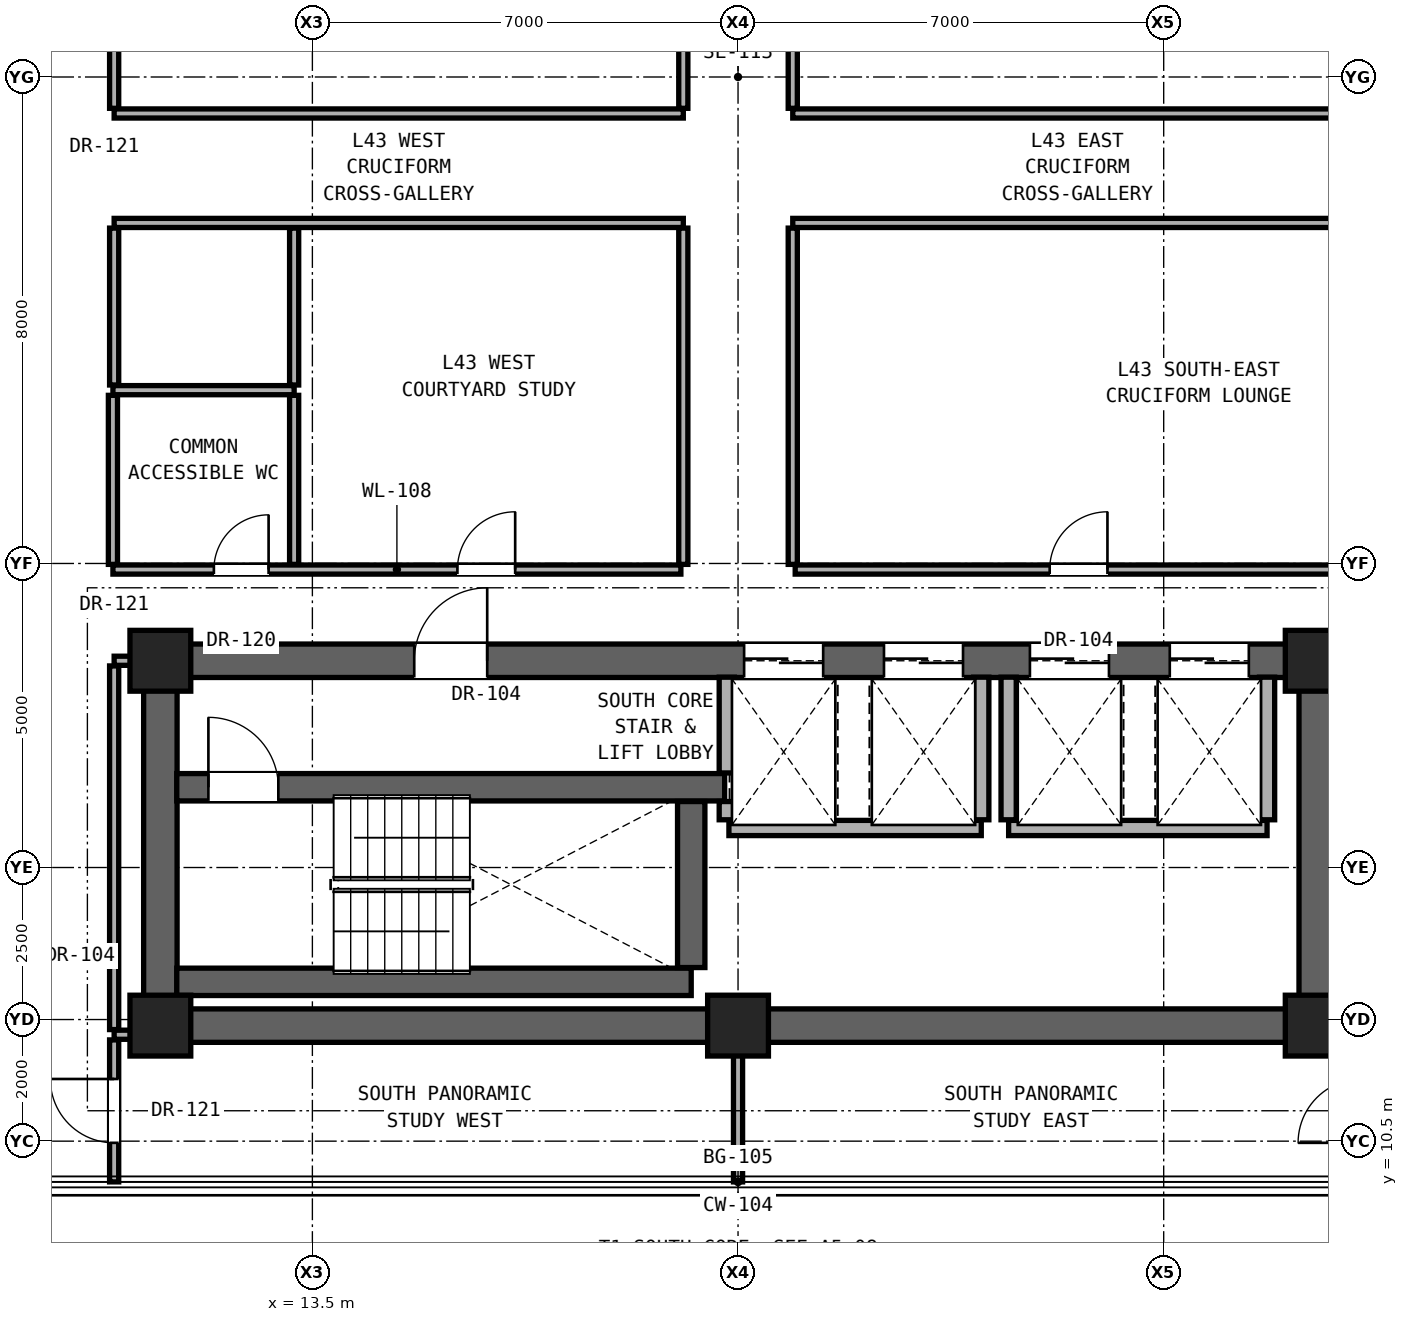
"""IFC4 building model, lengths in metres.
Left out: names, types, materials, properties, quantities, classifications, styles, units other than length and angle.
Written with IfcOpenShell. Run it as: python <this file> out.ifc"""

import sys

from ifc_helpers import new_model, si_unit, direction, frame, frame_2d, origin, origin_2d, place, context, subcontext, project, spatial, rectangle, extrude, element, fill, save


model = new_model("IFC4")
c1 = context("Model", 3, precision=1e-05, world=origin(), true_north=direction((0.0, 1.0)))
c2 = subcontext(c1, "Body", "Model", "MODEL_VIEW")
j1 = project(units=[si_unit("LENGTHUNIT", "METRE"), si_unit("PLANEANGLEUNIT", "RADIAN")], contexts=[c1])
p1 = place(None, origin())
s1 = spatial("IfcSite", under=j1, at=p1, CompositionType="ELEMENT")
p2 = place(p1, origin())
s2 = spatial("IfcBuilding", under=s1, at=p2, CompositionType="ELEMENT")
p3 = place(p2, frame((0.0, 0.0, 154.4)))
s3 = spatial("IfcBuildingStorey", under=s2, at=p3, CompositionType="ELEMENT", Elevation=154.4)
for number, where, z_axis, x_axis in (
    (1, (11.0, 12.4, 0.0), (0.0, 0.0, 1.0), (1.0, 0.0, 0.0)),
    (2, (20.5, 12.4, 0.0), (0.0, 0.0, 1.0), (1.0, 0.0, 0.0)),
    (3, (30.0, 12.4, 0.0), (0.0, 0.0, 1.0), (1.0, 0.0, 0.0)),
    (4, (11.0, 18.4, 0.0), (0.0, 0.0, 1.0), (1.0, 0.0, 0.0)),
    (5, (30.0, 18.4, 0.0), (0.0, 0.0, 1.0), (1.0, 0.0, 0.0)),
):
    element("IfcColumn", number, at=place(p3, frame(where, z_axis=z_axis, x_axis=x_axis)), inside=s3, PredefinedType="COLUMN", context=c2, shape_type="SweptSolid", body=[
        extrude(rectangle(XDim=1.0, YDim=1.0, at=origin_2d()), origin(), (0.0, 0.0, 1.0), 3.25),
    ])
p4 = place(p3, frame((11.0, 12.4, 0.0), z_axis=(0.0, 0.0, 1.0), x_axis=(1.0, 0.0, 0.0)))
e6 = element("IfcWall", 6, at=p4, inside=s3, PredefinedType="SHEAR", context=c2, shape_type="SweptSolid", body=[
    extrude(rectangle(XDim=19.0, YDim=0.55, at=frame_2d((9.5, 0.0))), origin(), (0.0, 0.0, 1.0), 3.05),
])
for number, where, z_axis, x_axis in (
    (7, (11.0, 12.4, 0.0), (0.0, 0.0, 1.0), (0.0, 1.0, 0.0)),
    (8, (30.0, 12.4, 0.0), (0.0, 0.0, 1.0), (0.0, 1.0, 0.0)),
):
    element("IfcWall", number, at=place(p3, frame(where, z_axis=z_axis, x_axis=x_axis)), inside=s3, PredefinedType="SHEAR", context=c2, shape_type="SweptSolid", body=[
        extrude(rectangle(XDim=6.0, YDim=0.55, at=frame_2d((3.0, 0.0))), origin(), (0.0, 0.0, 1.0), 3.05),
    ])
p5 = place(p3, frame((11.0, 18.4, 0.0), z_axis=(0.0, 0.0, 1.0), x_axis=(1.0, 0.0, 0.0)))
e9 = element("IfcWall", 9, at=p5, inside=s3, PredefinedType="SHEAR", context=c2, shape_type="SweptSolid", body=[
    extrude(rectangle(XDim=19.0, YDim=0.55, at=frame_2d((9.5, 0.0))), origin(), (0.0, 0.0, 1.0), 3.05),
])
p6 = place(p5, frame((4.175, 0.0, 0.0)))
e10 = element("IfcOpeningElement", 10, at=p6, cuts=e9, PredefinedType="OPENING", context=c2, shape_type="SweptSolid", body=[
    extrude(rectangle(XDim=1.2, YDim=2.25, at=frame_2d((0.6, 1.125))), frame((0.0, 0.285, 0.0), z_axis=(0.0, -1.0, 0.0), x_axis=(1.0, 0.0, 0.0)), (0.0, 0.0, 1.0), 0.57),
])
p7 = place(p5, frame((9.6, 0.0, 0.0)))
e11 = element("IfcOpeningElement", 11, at=p7, cuts=e9, PredefinedType="OPENING", context=c2, shape_type="SweptSolid", body=[
    extrude(rectangle(XDim=1.3, YDim=2.3, at=frame_2d((0.65, 1.15))), frame((0.0, 0.285, 0.0), z_axis=(0.0, -1.0, 0.0), x_axis=(1.0, 0.0, 0.0)), (0.0, 0.0, 1.0), 0.57),
])
p8 = place(p5, frame((11.9, 0.0, 0.0)))
e12 = element("IfcOpeningElement", 12, at=p8, cuts=e9, PredefinedType="OPENING", context=c2, shape_type="SweptSolid", body=[
    extrude(rectangle(XDim=1.3, YDim=2.3, at=frame_2d((0.65, 1.15))), frame((0.0, 0.285, 0.0), z_axis=(0.0, -1.0, 0.0), x_axis=(1.0, 0.0, 0.0)), (0.0, 0.0, 1.0), 0.57),
])
p9 = place(p5, frame((14.3, 0.0, 0.0)))
e13 = element("IfcOpeningElement", 13, at=p9, cuts=e9, PredefinedType="OPENING", context=c2, shape_type="SweptSolid", body=[
    extrude(rectangle(XDim=1.3, YDim=2.3, at=frame_2d((0.65, 1.15))), frame((0.0, 0.285, 0.0), z_axis=(0.0, -1.0, 0.0), x_axis=(1.0, 0.0, 0.0)), (0.0, 0.0, 1.0), 0.57),
])
p10 = place(p5, frame((16.6, 0.0, 0.0)))
e14 = element("IfcOpeningElement", 14, at=p10, cuts=e9, PredefinedType="OPENING", context=c2, shape_type="SweptSolid", body=[
    extrude(rectangle(XDim=1.3, YDim=2.3, at=frame_2d((0.65, 1.15))), frame((0.0, 0.285, 0.0), z_axis=(0.0, -1.0, 0.0), x_axis=(1.0, 0.0, 0.0)), (0.0, 0.0, 1.0), 0.57),
])
p11 = place(p3, frame((10.24, 12.25, 0.0), z_axis=(0.0, 0.0, 1.0), x_axis=(1.0, 0.0, 0.0)))
e15 = element("IfcWall", 15, at=p11, inside=s3, PredefinedType="PARTITIONING", context=c2, shape_type="SweptSolid", body=[
    extrude(rectangle(XDim=0.49, YDim=0.15, at=frame_2d((0.245, 0.0))), origin(), (0.0, 0.0, 1.0), 3.05),
])
p12 = place(p3, frame((11.27, 13.12, 0.0), z_axis=(0.0, 0.0, 1.0), x_axis=(1.0, 0.0, 0.0)))
e16 = element("IfcWall", 16, at=p12, inside=s3, PredefinedType="SHEAR", context=c2, shape_type="SweptSolid", body=[
    extrude(rectangle(XDim=8.46, YDim=0.45, at=frame_2d((4.23, 0.0))), origin(), (0.0, 0.0, 1.0), 3.05),
])
p13 = place(p3, frame((20.35, 15.65, 0.0), z_axis=(0.0, 0.0, 1.0), x_axis=(1.0, 0.0, 0.0)))
e17 = element("IfcWall", 17, at=p13, inside=s3, PredefinedType="SOLIDWALL", context=c2, shape_type="SweptSolid", body=[
    extrude(rectangle(XDim=4.15, YDim=0.25, at=frame_2d((2.075, 0.0))), origin(), (0.0, 0.0, 1.0), 3.05),
])
p14 = place(p3, frame((24.95, 15.65, 0.0), z_axis=(0.0, 0.0, 1.0), x_axis=(1.0, 0.0, 0.0)))
e18 = element("IfcWall", 18, at=p14, inside=s3, PredefinedType="SOLIDWALL", context=c2, shape_type="SweptSolid", body=[
    extrude(rectangle(XDim=4.25, YDim=0.25, at=frame_2d((2.125, 0.0))), origin(), (0.0, 0.0, 1.0), 3.05),
])
p15 = place(p3, frame((11.27, 16.32, 0.0), z_axis=(0.0, 0.0, 1.0), x_axis=(1.0, 0.0, 0.0)))
e19 = element("IfcWall", 19, at=p15, inside=s3, PredefinedType="SHEAR", context=c2, shape_type="SweptSolid", body=[
    extrude(rectangle(XDim=9.01, YDim=0.45, at=frame_2d((4.505, 0.0))), origin(), (0.0, 0.0, 1.0), 3.05),
])
p16 = place(p15, frame((0.52, 0.0, 0.0)))
e20 = element("IfcOpeningElement", 20, at=p16, cuts=e19, PredefinedType="OPENING", context=c2, shape_type="SweptSolid", body=[
    extrude(rectangle(XDim=1.15, YDim=2.2, at=frame_2d((0.575, 1.1))), frame((0.0, 0.235, 0.0), z_axis=(0.0, -1.0, 0.0), x_axis=(1.0, 0.0, 0.0)), (0.0, 0.0, 1.0), 0.47),
])
p17 = place(p3, frame((10.24, 18.4, 0.0), z_axis=(0.0, 0.0, 1.0), x_axis=(1.0, 0.0, 0.0)))
e21 = element("IfcWall", 21, at=p17, inside=s3, PredefinedType="PARTITIONING", context=c2, shape_type="SweptSolid", body=[
    extrude(rectangle(XDim=0.49, YDim=0.15, at=frame_2d((0.245, 0.0))), origin(), (0.0, 0.0, 1.0), 2.442),
])
p18 = place(p3, frame((10.22, 19.9, 0.0), z_axis=(0.0, 0.0, 1.0), x_axis=(1.0, 0.0, 0.0)))
e22 = element("IfcWall", 22, at=p18, inside=s3, PredefinedType="PARTITIONING", context=c2, shape_type="SweptSolid", body=[
    extrude(rectangle(XDim=9.34, YDim=0.15, at=frame_2d((4.67, 0.0))), origin(), (0.0, 0.0, 1.0), 2.186),
])
p19 = place(p18, frame((1.66, 0.0, 0.0)))
e23 = element("IfcOpeningElement", 23, at=p19, cuts=e22, PredefinedType="OPENING", context=c2, shape_type="SweptSolid", body=[
    extrude(rectangle(XDim=0.9, YDim=2.1, at=frame_2d((0.45, 1.05))), frame((0.0, 0.085, 0.0), z_axis=(0.0, -1.0, 0.0), x_axis=(1.0, 0.0, 0.0)), (0.0, 0.0, 1.0), 0.17),
])
p20 = place(p18, frame((5.665, 0.0, 0.0)))
e24 = element("IfcOpeningElement", 24, at=p20, cuts=e22, PredefinedType="OPENING", context=c2, shape_type="SweptSolid", body=[
    extrude(rectangle(XDim=0.95, YDim=2.15, at=frame_2d((0.475, 1.075))), frame((0.0, 0.085, 0.0), z_axis=(0.0, -1.0, 0.0), x_axis=(1.0, 0.0, 0.0)), (0.0, 0.0, 1.0), 0.17),
])
p21 = place(p3, frame((21.44, 19.9, 0.0), z_axis=(0.0, 0.0, 1.0), x_axis=(1.0, 0.0, 0.0)))
e25 = element("IfcWall", 25, at=p21, inside=s3, PredefinedType="PARTITIONING", context=c2, shape_type="SweptSolid", body=[
    extrude(rectangle(XDim=9.32, YDim=0.15, at=frame_2d((4.66, 0.0))), origin(), (0.0, 0.0, 1.0), 2.186),
])
p22 = place(p21, frame((4.185, 0.0, 0.0)))
e26 = element("IfcOpeningElement", 26, at=p22, cuts=e25, PredefinedType="OPENING", context=c2, shape_type="SweptSolid", body=[
    extrude(rectangle(XDim=0.95, YDim=2.15, at=frame_2d((0.475, 1.075))), frame((0.0, 0.085, 0.0), z_axis=(0.0, -1.0, 0.0), x_axis=(1.0, 0.0, 0.0)), (0.0, 0.0, 1.0), 0.17),
])
p23 = place(p3, frame((10.22, 22.85, 0.0), z_axis=(0.0, 0.0, 1.0), x_axis=(1.0, 0.0, 0.0)))
e27 = element("IfcWall", 27, at=p23, inside=s3, PredefinedType="PARTITIONING", context=c2, shape_type="SweptSolid", body=[
    extrude(rectangle(XDim=2.98, YDim=0.15, at=frame_2d((1.49, 0.0))), origin(), (0.0, 0.0, 1.0), 2.186),
])
for number, where, z_axis, x_axis in (
    (28, (10.24, 25.6, 0.0), (0.0, 0.0, 1.0), (1.0, 0.0, 0.0)),
    (29, (21.4, 25.6, 0.0), (0.0, 0.0, 1.0), (1.0, 0.0, 0.0)),
    (30, (10.24, 27.4, 0.0), (0.0, 0.0, 1.0), (1.0, 0.0, 0.0)),
    (31, (21.4, 27.4, 0.0), (0.0, 0.0, 1.0), (1.0, 0.0, 0.0)),
):
    element("IfcWall", number, at=place(p3, frame(where, z_axis=z_axis, x_axis=x_axis)), inside=s3, PredefinedType="PARTITIONING", context=c2, shape_type="SweptSolid", body=[
        extrude(rectangle(XDim=9.36, YDim=0.15, at=frame_2d((4.68, 0.0))), origin(), (0.0, 0.0, 1.0), 2.186),
    ])
p24 = place(p3, frame((10.22, 19.985, 0.0), z_axis=(0.0, 0.0, 1.0), x_axis=(0.0, 1.0, 0.0)))
e32 = element("IfcWall", 32, at=p24, inside=s3, PredefinedType="PARTITIONING", context=c2, shape_type="SweptSolid", body=[
    extrude(rectangle(XDim=2.78, YDim=0.15, at=frame_2d((1.39, 0.0))), origin(), (0.0, 0.0, 1.0), 3.05),
])
p25 = place(p3, frame((10.24, 9.83, 0.0), z_axis=(0.0, 0.0, 1.0), x_axis=(0.0, 1.0, 0.0)))
e33 = element("IfcWall", 33, at=p25, inside=s3, PredefinedType="PARTITIONING", context=c2, shape_type="SweptSolid", body=[
    extrude(rectangle(XDim=2.335, YDim=0.15, at=frame_2d((1.167, 0.0))), origin(), (0.0, 0.0, 1.0), 3.05),
])
p26 = place(p25, frame((0.643, 0.0, 0.0)))
e34 = element("IfcOpeningElement", 34, at=p26, cuts=e33, PredefinedType="OPENING", context=c2, shape_type="SweptSolid", body=[
    extrude(rectangle(XDim=1.05, YDim=2.2, at=frame_2d((0.525, 1.1))), frame((0.0, 0.085, 0.0), z_axis=(0.0, -1.0, 0.0), x_axis=(1.0, 0.0, 0.0)), (0.0, 0.0, 1.0), 0.17),
])
p27 = place(p3, frame((10.24, 12.335, 0.0), z_axis=(0.0, 0.0, 1.0), x_axis=(0.0, 1.0, 0.0)))
e35 = element("IfcWall", 35, at=p27, inside=s3, PredefinedType="PARTITIONING", context=c2, shape_type="SweptSolid", body=[
    extrude(rectangle(XDim=5.98, YDim=0.15, at=frame_2d((2.99, 0.0))), origin(), (0.0, 0.0, 1.0), 2.442),
])
p28 = place(p3, frame((10.24, 22.935, 0.0), z_axis=(0.0, 0.0, 1.0), x_axis=(0.0, 1.0, 0.0)))
e36 = element("IfcWall", 36, at=p28, inside=s3, PredefinedType="PARTITIONING", context=c2, shape_type="SweptSolid", body=[
    extrude(rectangle(XDim=2.58, YDim=0.15, at=frame_2d((1.29, 0.0))), origin(), (0.0, 0.0, 1.0), 2.346),
])
p29 = place(p3, frame((10.24, 27.485, 0.0), z_axis=(0.0, 0.0, 1.0), x_axis=(0.0, 1.0, 0.0)))
e37 = element("IfcWall", 37, at=p29, inside=s3, PredefinedType="PARTITIONING", context=c2, shape_type="SweptSolid", body=[
    extrude(rectangle(XDim=5.53, YDim=0.15, at=frame_2d((2.765, 0.0))), origin(), (0.0, 0.0, 1.0), 2.346),
])
p30 = place(p29, frame((2.29, 0.0, 0.0)))
e38 = element("IfcOpeningElement", 38, at=p30, cuts=e37, PredefinedType="OPENING", context=c2, shape_type="SweptSolid", body=[
    extrude(rectangle(XDim=0.95, YDim=2.15, at=frame_2d((0.475, 1.075))), frame((0.0, 0.085, 0.0), z_axis=(0.0, -1.0, 0.0), x_axis=(1.0, 0.0, 0.0)), (0.0, 0.0, 1.0), 0.17),
])
p31 = place(p3, frame((13.2, 19.985, 0.0), z_axis=(0.0, 0.0, 1.0), x_axis=(0.0, 1.0, 0.0)))
e39 = element("IfcWall", 39, at=p31, inside=s3, PredefinedType="PARTITIONING", context=c2, shape_type="SweptSolid", body=[
    extrude(rectangle(XDim=2.78, YDim=0.15, at=frame_2d((1.39, 0.0))), origin(), (0.0, 0.0, 1.0), 3.05),
])
p32 = place(p3, frame((13.2, 22.935, 0.0), z_axis=(0.0, 0.0, 1.0), x_axis=(0.0, 1.0, 0.0)))
e40 = element("IfcWall", 40, at=p32, inside=s3, PredefinedType="PARTITIONING", context=c2, shape_type="SweptSolid", body=[
    extrude(rectangle(XDim=2.58, YDim=0.15, at=frame_2d((1.29, 0.0))), origin(), (0.0, 0.0, 1.0), 2.186),
])
for number, where, z_axis, x_axis in (
    (41, (19.6, 19.985, 0.0), (0.0, 0.0, 1.0), (0.0, 1.0, 0.0)),
    (42, (19.6, 27.485, 0.0), (0.0, 0.0, 1.0), (0.0, 1.0, 0.0)),
):
    element("IfcWall", number, at=place(p3, frame(where, z_axis=z_axis, x_axis=x_axis)), inside=s3, PredefinedType="PARTITIONING", context=c2, shape_type="SweptSolid", body=[
        extrude(rectangle(XDim=5.53, YDim=0.15, at=frame_2d((2.765, 0.0))), origin(), (0.0, 0.0, 1.0), 2.186),
    ])
p33 = place(p3, frame((19.73, 13.355, 0.0), z_axis=(0.0, 0.0, 1.0), x_axis=(0.0, 1.0, 0.0)))
e43 = element("IfcWall", 43, at=p33, inside=s3, PredefinedType="SHEAR", context=c2, shape_type="SweptSolid", body=[
    extrude(rectangle(XDim=2.73, YDim=0.45, at=frame_2d((1.365, 0.0))), origin(), (0.0, 0.0, 1.0), 3.05),
])
p34 = place(p3, frame((20.315, 15.785, 0.0), z_axis=(0.0, 0.0, 1.0), x_axis=(0.0, 1.0, 0.0)))
e44 = element("IfcWall", 44, at=p34, inside=s3, PredefinedType="SOLIDWALL", context=c2, shape_type="SweptSolid", body=[
    extrude(rectangle(XDim=0.3, YDim=0.25, at=frame_2d((0.15, 0.0))), origin(), (0.0, 0.0, 1.0), 3.05),
])
p35 = place(p3, frame((20.315, 16.555, 0.0), z_axis=(0.0, 0.0, 1.0), x_axis=(0.0, 1.0, 0.0)))
e45 = element("IfcWall", 45, at=p35, inside=s3, PredefinedType="SOLIDWALL", context=c2, shape_type="SweptSolid", body=[
    extrude(rectangle(XDim=1.575, YDim=0.25, at=frame_2d((0.788, 0.0))), origin(), (0.0, 0.0, 1.0), 3.05),
])
p36 = place(p3, frame((20.5, 9.83, 0.0), z_axis=(0.0, 0.0, 1.0), x_axis=(0.0, 1.0, 0.0)))
e46 = element("IfcWall", 46, at=p36, inside=s3, PredefinedType="PARTITIONING", context=c2, shape_type="SweptSolid", body=[
    extrude(rectangle(XDim=2.3, YDim=0.15, at=frame_2d((1.15, 0.0))), origin(), (0.0, 0.0, 1.0), 3.05),
])
for number, where, z_axis, x_axis in (
    (47, (21.4, 19.985, 0.0), (0.0, 0.0, 1.0), (0.0, 1.0, 0.0)),
    (48, (21.4, 27.485, 0.0), (0.0, 0.0, 1.0), (0.0, 1.0, 0.0)),
):
    element("IfcWall", number, at=place(p3, frame(where, z_axis=z_axis, x_axis=x_axis)), inside=s3, PredefinedType="PARTITIONING", context=c2, shape_type="SweptSolid", body=[
        extrude(rectangle(XDim=5.53, YDim=0.15, at=frame_2d((2.765, 0.0))), origin(), (0.0, 0.0, 1.0), 2.186),
    ])
for number, where, z_axis, x_axis in (
    (49, (24.5, 15.785, 0.0), (0.0, 0.0, 1.0), (0.0, 1.0, 0.0)),
    (50, (24.95, 15.785, 0.0), (0.0, 0.0, 1.0), (0.0, 1.0, 0.0)),
    (51, (29.2, 15.785, 0.0), (0.0, 0.0, 1.0), (0.0, 1.0, 0.0)),
):
    element("IfcWall", number, at=place(p3, frame(where, z_axis=z_axis, x_axis=x_axis)), inside=s3, PredefinedType="SOLIDWALL", context=c2, shape_type="SweptSolid", body=[
        extrude(rectangle(XDim=2.345, YDim=0.25, at=frame_2d((1.172, 0.0))), origin(), (0.0, 0.0, 1.0), 3.05),
    ])
p37 = place(p6, origin())
e52 = element("IfcDoor", 52, at=p37, inside=s3, OperationType="SINGLE_SWING_RIGHT", PredefinedType="DOOR", context=c2, shape_type="SweptSolid", body=[
    extrude(rectangle(XDim=1.2, YDim=2.25, at=frame_2d((0.6, 1.125))), frame((0.0, 0.025, 0.0), z_axis=(0.0, -1.0, 0.0), x_axis=(1.0, 0.0, 0.0)), (0.0, 0.0, 1.0), 0.05),
])
fill(e10, e52)
p38 = place(p16, origin())
e53 = element("IfcDoor", 53, at=p38, inside=s3, OperationType="SINGLE_SWING_LEFT", PredefinedType="DOOR", context=c2, shape_type="SweptSolid", body=[
    extrude(rectangle(XDim=1.15, YDim=2.2, at=frame_2d((0.575, 1.1))), frame((0.0, 0.025, 0.0), z_axis=(0.0, -1.0, 0.0), x_axis=(1.0, 0.0, 0.0)), (0.0, 0.0, 1.0), 0.05),
])
fill(e20, e53)
p39 = place(p19, origin())
e54 = element("IfcDoor", 54, at=p39, inside=s3, OperationType="SINGLE_SWING_RIGHT", PredefinedType="DOOR", context=c2, shape_type="SweptSolid", body=[
    extrude(rectangle(XDim=0.9, YDim=2.1, at=frame_2d((0.45, 1.05))), frame((0.0, 0.025, 0.0), z_axis=(0.0, -1.0, 0.0), x_axis=(1.0, 0.0, 0.0)), (0.0, 0.0, 1.0), 0.05),
])
fill(e23, e54)
p40 = place(p20, origin())
e55 = element("IfcDoor", 55, at=p40, inside=s3, OperationType="SINGLE_SWING_RIGHT", PredefinedType="DOOR", context=c2, shape_type="SweptSolid", body=[
    extrude(rectangle(XDim=0.95, YDim=2.15, at=frame_2d((0.475, 1.075))), frame((0.0, 0.025, 0.0), z_axis=(0.0, -1.0, 0.0), x_axis=(1.0, 0.0, 0.0)), (0.0, 0.0, 1.0), 0.05),
])
fill(e24, e55)
p41 = place(p22, origin())
e56 = element("IfcDoor", 56, at=p41, inside=s3, OperationType="SINGLE_SWING_RIGHT", PredefinedType="DOOR", context=c2, shape_type="SweptSolid", body=[
    extrude(rectangle(XDim=0.95, YDim=2.15, at=frame_2d((0.475, 1.075))), frame((0.0, 0.025, 0.0), z_axis=(0.0, -1.0, 0.0), x_axis=(1.0, 0.0, 0.0)), (0.0, 0.0, 1.0), 0.05),
])
fill(e26, e56)
p42 = place(p26, origin())
e57 = element("IfcDoor", 57, at=p42, inside=s3, OperationType="SINGLE_SWING_RIGHT", PredefinedType="DOOR", context=c2, shape_type="SweptSolid", body=[
    extrude(rectangle(XDim=1.05, YDim=2.2, at=frame_2d((0.525, 1.1))), frame((0.0, 0.025, 0.0), z_axis=(0.0, -1.0, 0.0), x_axis=(1.0, 0.0, 0.0)), (0.0, 0.0, 1.0), 0.05),
])
fill(e34, e57)
p43 = place(p7, origin())
e58 = element("IfcDoor", 58, at=p43, inside=s3, OperationType="DOUBLE_DOOR_SLIDING", PredefinedType="DOOR", context=c2, shape_type="SweptSolid", body=[
    extrude(rectangle(XDim=1.3, YDim=2.3, at=frame_2d((0.65, 1.15))), frame((0.0, 0.025, 0.0), z_axis=(0.0, -1.0, 0.0), x_axis=(1.0, 0.0, 0.0)), (0.0, 0.0, 1.0), 0.05),
])
fill(e11, e58)
p44 = place(p8, origin())
e59 = element("IfcDoor", 59, at=p44, inside=s3, OperationType="DOUBLE_DOOR_SLIDING", PredefinedType="DOOR", context=c2, shape_type="SweptSolid", body=[
    extrude(rectangle(XDim=1.3, YDim=2.3, at=frame_2d((0.65, 1.15))), frame((0.0, 0.025, 0.0), z_axis=(0.0, -1.0, 0.0), x_axis=(1.0, 0.0, 0.0)), (0.0, 0.0, 1.0), 0.05),
])
fill(e12, e59)
p45 = place(p9, origin())
e60 = element("IfcDoor", 60, at=p45, inside=s3, OperationType="DOUBLE_DOOR_SLIDING", PredefinedType="DOOR", context=c2, shape_type="SweptSolid", body=[
    extrude(rectangle(XDim=1.3, YDim=2.3, at=frame_2d((0.65, 1.15))), frame((0.0, 0.025, 0.0), z_axis=(0.0, -1.0, 0.0), x_axis=(1.0, 0.0, 0.0)), (0.0, 0.0, 1.0), 0.05),
])
fill(e13, e60)
p46 = place(p10, origin())
e61 = element("IfcDoor", 61, at=p46, inside=s3, OperationType="DOUBLE_DOOR_SLIDING", PredefinedType="DOOR", context=c2, shape_type="SweptSolid", body=[
    extrude(rectangle(XDim=1.3, YDim=2.3, at=frame_2d((0.65, 1.15))), frame((0.0, 0.025, 0.0), z_axis=(0.0, -1.0, 0.0), x_axis=(1.0, 0.0, 0.0)), (0.0, 0.0, 1.0), 0.05),
])
fill(e14, e61)
save(model, sys.argv[1])
